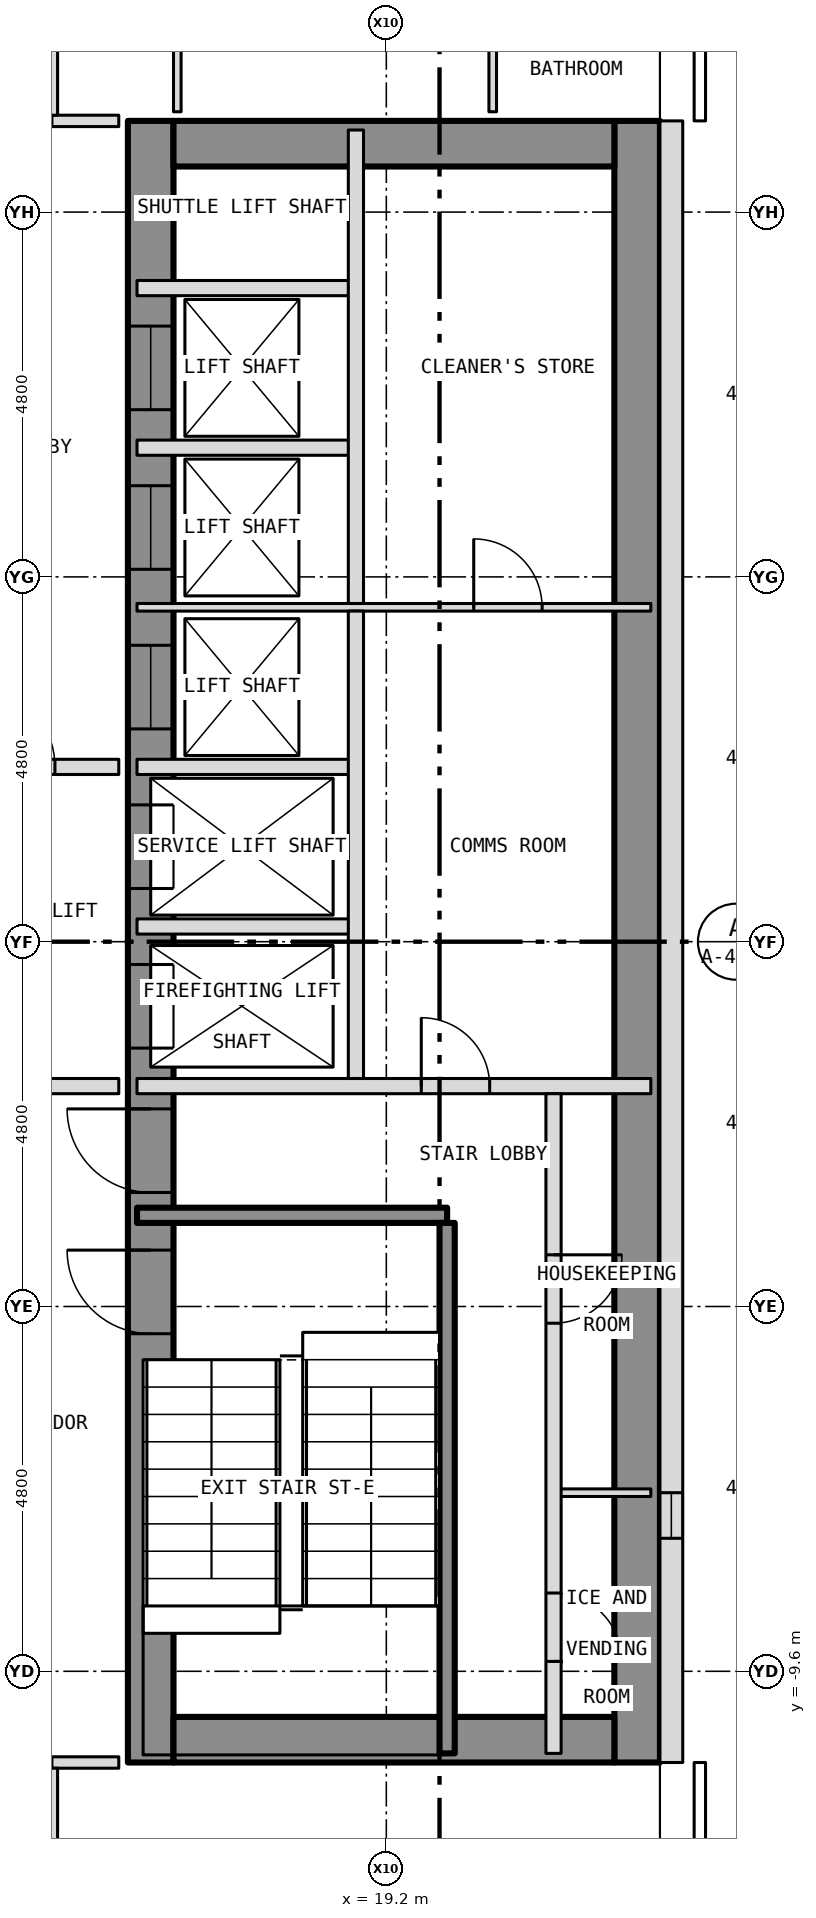
"""IFC4 building model, lengths in metres.
Left out: names, types, materials, properties, quantities, classifications, styles, units other than length and angle.
Written with IfcOpenShell. Run it as: python <this file> out.ifc"""

import sys

from ifc_helpers import new_model, si_unit, direction, frame, frame_2d, origin, place, context, subcontext, project, spatial, rectangle, extrude, element, fill, save


model = new_model("IFC4")
c1 = context("Model", 3, precision=1e-05, world=origin(), true_north=direction((0.0, 1.0)))
c2 = subcontext(c1, "Body", "Model", "MODEL_VIEW")
j1 = project(units=[si_unit("LENGTHUNIT", "METRE"), si_unit("PLANEANGLEUNIT", "RADIAN")], contexts=[c1])
p1 = place(None, origin())
s1 = spatial("IfcSite", under=j1, at=p1, CompositionType="ELEMENT")
p2 = place(p1, origin())
s2 = spatial("IfcBuilding", under=s1, at=p2, CompositionType="ELEMENT")
p3 = place(p2, frame((0.0, 0.0, 131.0)))
s3 = spatial("IfcBuildingStorey", under=s2, at=p3, CompositionType="ELEMENT", Elevation=131.0)
p4 = place(p3, frame((16.1, -10.8, 0.0), z_axis=(0.0, 0.0, 1.0), x_axis=(0.0, 1.0, 0.0)))
e1 = element("IfcWall", 1, at=p4, inside=s3, PredefinedType="SHEAR", context=c2, shape_type="SweptSolid", body=[
    extrude(rectangle(XDim=21.6, YDim=0.6, at=frame_2d((10.8, 0.0))), origin(), (0.0, 0.0, 1.0), 3.25),
])
p5 = place(p4, frame((9.4, 0.0, 0.0)))
e2 = element("IfcOpeningElement", 2, at=p5, cuts=e1, PredefinedType="OPENING", context=c2, shape_type="SweptSolid", body=[
    extrude(rectangle(XDim=1.1, YDim=2.1, at=frame_2d((0.55, 1.05))), frame((0.0, 0.312, 0.0), z_axis=(0.0, -1.0, 0.0), x_axis=(1.0, 0.0, 0.0)), (0.0, 0.0, 1.0), 0.624),
])
p6 = place(p4, frame((11.5, 0.0, 0.0)))
e3 = element("IfcOpeningElement", 3, at=p6, cuts=e1, PredefinedType="OPENING", context=c2, shape_type="SweptSolid", body=[
    extrude(rectangle(XDim=1.1, YDim=2.1, at=frame_2d((0.55, 1.05))), frame((0.0, 0.312, 0.0), z_axis=(0.0, -1.0, 0.0), x_axis=(1.0, 0.0, 0.0)), (0.0, 0.0, 1.0), 0.624),
])
p7 = place(p4, frame((13.6, 0.0, 0.0)))
e4 = element("IfcOpeningElement", 4, at=p7, cuts=e1, PredefinedType="OPENING", context=c2, shape_type="SweptSolid", body=[
    extrude(rectangle(XDim=1.1, YDim=2.1, at=frame_2d((0.55, 1.05))), frame((0.0, 0.312, 0.0), z_axis=(0.0, -1.0, 0.0), x_axis=(1.0, 0.0, 0.0)), (0.0, 0.0, 1.0), 0.624),
])
p8 = place(p4, frame((15.7, 0.0, 0.0)))
e5 = element("IfcOpeningElement", 5, at=p8, cuts=e1, PredefinedType="OPENING", context=c2, shape_type="SweptSolid", body=[
    extrude(rectangle(XDim=1.1, YDim=2.1, at=frame_2d((0.55, 1.05))), frame((0.0, 0.312, 0.0), z_axis=(0.0, -1.0, 0.0), x_axis=(1.0, 0.0, 0.0)), (0.0, 0.0, 1.0), 0.624),
])
p9 = place(p4, frame((17.8, 0.0, 0.0)))
e6 = element("IfcOpeningElement", 6, at=p9, cuts=e1, PredefinedType="OPENING", context=c2, shape_type="SweptSolid", body=[
    extrude(rectangle(XDim=1.1, YDim=2.1, at=frame_2d((0.55, 1.05))), frame((0.0, 0.312, 0.0), z_axis=(0.0, -1.0, 0.0), x_axis=(1.0, 0.0, 0.0)), (0.0, 0.0, 1.0), 0.624),
])
p10 = place(p4, frame((5.642, 0.0, 0.0)))
e7 = element("IfcOpeningElement", 7, at=p10, cuts=e1, PredefinedType="OPENING", context=c2, shape_type="SweptSolid", body=[
    extrude(rectangle(XDim=1.1, YDim=2.1, at=frame_2d((0.55, 1.05))), frame((0.0, 0.312, 0.0), z_axis=(0.0, -1.0, 0.0), x_axis=(1.0, 0.0, 0.0)), (0.0, 0.0, 1.0), 0.624),
])
p11 = place(p4, frame((7.5, 0.0, 0.0)))
e8 = element("IfcOpeningElement", 8, at=p11, cuts=e1, PredefinedType="OPENING", context=c2, shape_type="SweptSolid", body=[
    extrude(rectangle(XDim=1.1, YDim=2.1, at=frame_2d((0.55, 1.05))), frame((0.0, 0.312, 0.0), z_axis=(0.0, -1.0, 0.0), x_axis=(1.0, 0.0, 0.0)), (0.0, 0.0, 1.0), 0.624),
])
p12 = place(p3, frame((22.5, -10.8, 0.0), z_axis=(0.0, 0.0, 1.0), x_axis=(0.0, 1.0, 0.0)))
e9 = element("IfcWall", 9, at=p12, inside=s3, PredefinedType="SHEAR", context=c2, shape_type="SweptSolid", body=[
    extrude(rectangle(XDim=21.6, YDim=0.6, at=frame_2d((10.8, 0.0))), origin(), (0.0, 0.0, 1.0), 3.25),
])
for number, where, z_axis, x_axis in (
    (10, (16.4, 10.5, 0.0), (0.0, 0.0, 1.0), (1.0, 0.0, 0.0)),
    (11, (16.4, -10.5, 0.0), (0.0, 0.0, 1.0), (1.0, 0.0, 0.0)),
):
    element("IfcWall", number, at=place(p3, frame(where, z_axis=z_axis, x_axis=x_axis)), inside=s3, PredefinedType="SHEAR", context=c2, shape_type="SweptSolid", body=[
        extrude(rectangle(XDim=5.8, YDim=0.6, at=frame_2d((2.9, 0.0))), origin(), (0.0, 0.0, 1.0), 3.25),
    ])
p13 = place(p3, frame((22.95, -10.8, 0.0), z_axis=(0.0, 0.0, 1.0), x_axis=(0.0, 1.0, 0.0)))
e12 = element("IfcWall", 12, at=p13, inside=s3, PredefinedType="SOLIDWALL", context=c2, shape_type="SweptSolid", body=[
    extrude(rectangle(XDim=21.6, YDim=0.3, at=frame_2d((10.8, 0.0))), origin(), (0.0, 0.0, 1.0), 3.5),
])
p14 = place(p13, frame((2.95, 0.0, 1.0)))
e13 = element("IfcOpeningElement", 13, at=p14, cuts=e12, PredefinedType="OPENING", context=c2, shape_type="SweptSolid", body=[
    extrude(rectangle(XDim=0.6, YDim=1.5, at=frame_2d((0.3, 0.75))), frame((0.0, 0.162, 0.0), z_axis=(0.0, -1.0, 0.0), x_axis=(1.0, 0.0, 0.0)), (0.0, 0.0, 1.0), 0.324),
])
p15 = place(p3, frame((14.8, -10.8, 0.0), z_axis=(0.0, 0.0, 1.0), x_axis=(1.0, 0.0, 0.0)))
e14 = element("IfcWall", 14, at=p15, inside=s3, PredefinedType="PARTITIONING", context=c2, shape_type="SweptSolid", body=[
    extrude(rectangle(XDim=0.88, YDim=0.15, at=frame_2d((0.44, 0.0))), origin(), (0.0, 0.0, 1.0), 3.35),
])
p16 = place(p3, frame((21.4, -7.25, 0.0), z_axis=(0.0, 0.0, 1.0), x_axis=(1.0, 0.0, 0.0)))
e15 = element("IfcWall", 15, at=p16, inside=s3, PredefinedType="PARTITIONING", context=c2, shape_type="SweptSolid", body=[
    extrude(rectangle(XDim=1.28, YDim=0.1, at=frame_2d((0.64, 0.0))), origin(), (0.0, 0.0, 1.0), 3.25),
])
p17 = place(p3, frame((15.92, -3.6, 0.0), z_axis=(0.0, 0.0, 1.0), x_axis=(1.0, 0.0, 0.0)))
e16 = element("IfcWall", 16, at=p17, inside=s3, PredefinedType="SHEAR", context=c2, shape_type="SweptSolid", body=[
    extrude(rectangle(XDim=4.08, YDim=0.2, at=frame_2d((2.04, 0.0))), origin(), (0.0, 0.0, 1.0), 3.25),
])
p18 = place(p3, frame((12.4, -1.9, 0.0), z_axis=(0.0, 0.0, 1.0), x_axis=(1.0, 0.0, 0.0)))
e17 = element("IfcWall", 17, at=p18, inside=s3, PredefinedType="PARTITIONING", context=c2, shape_type="SweptSolid", body=[
    extrude(rectangle(XDim=3.28, YDim=0.2, at=frame_2d((1.64, 0.0))), origin(), (0.0, 0.0, 1.0), 3.35),
])
p19 = place(p18, frame((1.24, 0.0, 0.0)))
e18 = element("IfcOpeningElement", 18, at=p19, cuts=e17, PredefinedType="OPENING", context=c2, shape_type="SweptSolid", body=[
    extrude(rectangle(XDim=1.1, YDim=2.1, at=frame_2d((0.55, 1.05))), frame((0.0, 0.112, 0.0), z_axis=(0.0, -1.0, 0.0), x_axis=(1.0, 0.0, 0.0)), (0.0, 0.0, 1.0), 0.224),
])
p20 = place(p3, frame((15.92, -1.9, 0.0), z_axis=(0.0, 0.0, 1.0), x_axis=(1.0, 0.0, 0.0)))
e19 = element("IfcWall", 19, at=p20, inside=s3, PredefinedType="PARTITIONING", context=c2, shape_type="SweptSolid", body=[
    extrude(rectangle(XDim=6.76, YDim=0.2, at=frame_2d((3.38, 0.0))), origin(), (0.0, 0.0, 1.0), 3.25),
])
p21 = place(p20, frame((3.74, 0.0, 0.0)))
e20 = element("IfcOpeningElement", 20, at=p21, cuts=e19, PredefinedType="OPENING", context=c2, shape_type="SweptSolid", body=[
    extrude(rectangle(XDim=0.9, YDim=2.1, at=frame_2d((0.45, 1.05))), frame((0.0, 0.112, 0.0), z_axis=(0.0, -1.0, 0.0), x_axis=(1.0, 0.0, 0.0)), (0.0, 0.0, 1.0), 0.224),
])
p22 = place(p3, frame((15.92, 0.2, 0.0), z_axis=(0.0, 0.0, 1.0), x_axis=(1.0, 0.0, 0.0)))
e21 = element("IfcWall", 21, at=p22, inside=s3, PredefinedType="PARTITIONING", context=c2, shape_type="SweptSolid", body=[
    extrude(rectangle(XDim=2.88, YDim=0.2, at=frame_2d((1.44, 0.0))), origin(), (0.0, 0.0, 1.0), 3.25),
])
p23 = place(p3, frame((12.4, 2.3, 0.0), z_axis=(0.0, 0.0, 1.0), x_axis=(1.0, 0.0, 0.0)))
e22 = element("IfcWall", 22, at=p23, inside=s3, PredefinedType="PARTITIONING", context=c2, shape_type="SweptSolid", body=[
    extrude(rectangle(XDim=3.28, YDim=0.2, at=frame_2d((1.64, 0.0))), origin(), (0.0, 0.0, 1.0), 3.35),
])
p24 = place(p23, frame((1.34, 0.0, 0.0)))
e23 = element("IfcOpeningElement", 23, at=p24, cuts=e22, PredefinedType="OPENING", context=c2, shape_type="SweptSolid", body=[
    extrude(rectangle(XDim=1.1, YDim=2.1, at=frame_2d((0.55, 1.05))), frame((0.0, 0.112, 0.0), z_axis=(0.0, -1.0, 0.0), x_axis=(1.0, 0.0, 0.0)), (0.0, 0.0, 1.0), 0.224),
])
p25 = place(p3, frame((15.92, 2.3, 0.0), z_axis=(0.0, 0.0, 1.0), x_axis=(1.0, 0.0, 0.0)))
e24 = element("IfcWall", 24, at=p25, inside=s3, PredefinedType="PARTITIONING", context=c2, shape_type="SweptSolid", body=[
    extrude(rectangle(XDim=2.88, YDim=0.2, at=frame_2d((1.44, 0.0))), origin(), (0.0, 0.0, 1.0), 3.25),
])
p26 = place(p3, frame((15.92, 4.4, 0.0), z_axis=(0.0, 0.0, 1.0), x_axis=(1.0, 0.0, 0.0)))
e25 = element("IfcWall", 25, at=p26, inside=s3, PredefinedType="PARTITIONING", context=c2, shape_type="SweptSolid", body=[
    extrude(rectangle(XDim=6.76, YDim=0.1, at=frame_2d((3.38, 0.0))), origin(), (0.0, 0.0, 1.0), 3.25),
])
p27 = place(p26, frame((4.43, 0.0, 0.0)))
e26 = element("IfcOpeningElement", 26, at=p27, cuts=e25, PredefinedType="OPENING", context=c2, shape_type="SweptSolid", body=[
    extrude(rectangle(XDim=0.9, YDim=2.1, at=frame_2d((0.45, 1.05))), frame((0.0, 0.062, 0.0), z_axis=(0.0, -1.0, 0.0), x_axis=(1.0, 0.0, 0.0)), (0.0, 0.0, 1.0), 0.124),
])
for number, where, z_axis, x_axis in (
    (27, (15.92, 6.5, 0.0), (0.0, 0.0, 1.0), (1.0, 0.0, 0.0)),
    (28, (15.92, 8.6, 0.0), (0.0, 0.0, 1.0), (1.0, 0.0, 0.0)),
):
    element("IfcWall", number, at=place(p3, frame(where, z_axis=z_axis, x_axis=x_axis)), inside=s3, PredefinedType="PARTITIONING", context=c2, shape_type="SweptSolid", body=[
        extrude(rectangle(XDim=2.88, YDim=0.2, at=frame_2d((1.44, 0.0))), origin(), (0.0, 0.0, 1.0), 3.25),
    ])
p28 = place(p3, frame((14.8, 10.8, 0.0), z_axis=(0.0, 0.0, 1.0), x_axis=(1.0, 0.0, 0.0)))
e29 = element("IfcWall", 29, at=p28, inside=s3, PredefinedType="PARTITIONING", context=c2, shape_type="SweptSolid", body=[
    extrude(rectangle(XDim=0.88, YDim=0.15, at=frame_2d((0.44, 0.0))), origin(), (0.0, 0.0, 1.0), 3.35),
])
p29 = place(p3, frame((14.8, -14.725, 0.0), z_axis=(0.0, 0.0, 1.0), x_axis=(0.0, 1.0, 0.0)))
e30 = element("IfcWall", 30, at=p29, inside=s3, PredefinedType="PARTITIONING", context=c2, shape_type="SweptSolid", body=[
    extrude(rectangle(XDim=3.85, YDim=0.15, at=frame_2d((1.925, 0.0))), origin(), (0.0, 0.0, 1.0), 3.35),
])
p30 = place(p29, frame((0.525, 0.0, 0.0)))
e31 = element("IfcOpeningElement", 31, at=p30, cuts=e30, PredefinedType="OPENING", context=c2, shape_type="SweptSolid", body=[
    extrude(rectangle(XDim=1.0, YDim=2.1, at=frame_2d((0.5, 1.05))), frame((0.0, 0.087, 0.0), z_axis=(0.0, -1.0, 0.0), x_axis=(1.0, 0.0, 0.0)), (0.0, 0.0, 1.0), 0.174),
])
p31 = place(p3, frame((14.8, 10.875, 0.0), z_axis=(0.0, 0.0, 1.0), x_axis=(0.0, 1.0, 0.0)))
e32 = element("IfcWall", 32, at=p31, inside=s3, PredefinedType="PARTITIONING", context=c2, shape_type="SweptSolid", body=[
    extrude(rectangle(XDim=3.85, YDim=0.15, at=frame_2d((1.925, 0.0))), origin(), (0.0, 0.0, 1.0), 3.35),
])
p32 = place(p31, frame((2.325, 0.0, 0.0)))
e33 = element("IfcOpeningElement", 33, at=p32, cuts=e32, PredefinedType="OPENING", context=c2, shape_type="SweptSolid", body=[
    extrude(rectangle(XDim=1.0, YDim=2.1, at=frame_2d((0.5, 1.05))), frame((0.0, 0.087, 0.0), z_axis=(0.0, -1.0, 0.0), x_axis=(1.0, 0.0, 0.0)), (0.0, 0.0, 1.0), 0.174),
])
p33 = place(p3, frame((16.45, 10.92, 0.0), z_axis=(0.0, 0.0, 1.0), x_axis=(0.0, 1.0, 0.0)))
e34 = element("IfcWall", 34, at=p33, inside=s3, PredefinedType="PARTITIONING", context=c2, shape_type="SweptSolid", body=[
    extrude(rectangle(XDim=12.36, YDim=0.1, at=frame_2d((6.18, 0.0))), origin(), (0.0, 0.0, 1.0), 3.35),
])
p34 = place(p33, frame((5.43, 0.0, 0.0)))
e35 = element("IfcOpeningElement", 35, at=p34, cuts=e34, PredefinedType="OPENING", context=c2, shape_type="SweptSolid", body=[
    extrude(rectangle(XDim=0.9, YDim=2.1, at=frame_2d((0.45, 1.05))), frame((0.0, 0.062, 0.0), z_axis=(0.0, -1.0, 0.0), x_axis=(1.0, 0.0, 0.0)), (0.0, 0.0, 1.0), 0.124),
])
p35 = place(p3, frame((18.8, -1.8, 0.0), z_axis=(0.0, 0.0, 1.0), x_axis=(0.0, 1.0, 0.0)))
e36 = element("IfcWall", 36, at=p35, inside=s3, PredefinedType="PARTITIONING", context=c2, shape_type="SweptSolid", body=[
    extrude(rectangle(XDim=6.15, YDim=0.2, at=frame_2d((3.075, 0.0))), origin(), (0.0, 0.0, 1.0), 3.25),
])
p36 = place(p3, frame((18.8, 4.45, 0.0), z_axis=(0.0, 0.0, 1.0), x_axis=(0.0, 1.0, 0.0)))
e37 = element("IfcWall", 37, at=p36, inside=s3, PredefinedType="PARTITIONING", context=c2, shape_type="SweptSolid", body=[
    extrude(rectangle(XDim=6.23, YDim=0.2, at=frame_2d((3.115, 0.0))), origin(), (0.0, 0.0, 1.0), 3.25),
])
p37 = place(p3, frame((20.0, -10.68, 0.0), z_axis=(0.0, 0.0, 1.0), x_axis=(0.0, 1.0, 0.0)))
e38 = element("IfcWall", 38, at=p37, inside=s3, PredefinedType="SHEAR", context=c2, shape_type="SweptSolid", body=[
    extrude(rectangle(XDim=6.98, YDim=0.2, at=frame_2d((3.49, 0.0))), origin(), (0.0, 0.0, 1.0), 3.25),
])
p38 = place(p3, frame((20.6, 10.92, 0.0), z_axis=(0.0, 0.0, 1.0), x_axis=(0.0, 1.0, 0.0)))
e39 = element("IfcWall", 39, at=p38, inside=s3, PredefinedType="PARTITIONING", context=c2, shape_type="SweptSolid", body=[
    extrude(rectangle(XDim=3.03, YDim=0.1, at=frame_2d((1.515, 0.0))), origin(), (0.0, 0.0, 1.0), 3.35),
])
p39 = place(p38, frame((1.67, 0.0, 0.0)))
e40 = element("IfcOpeningElement", 40, at=p39, cuts=e39, PredefinedType="OPENING", context=c2, shape_type="SweptSolid", body=[
    extrude(rectangle(XDim=0.9, YDim=2.1, at=frame_2d((0.45, 1.05))), frame((0.0, 0.062, 0.0), z_axis=(0.0, -1.0, 0.0), x_axis=(1.0, 0.0, 0.0)), (0.0, 0.0, 1.0), 0.124),
])
p40 = place(p3, frame((21.4, -10.68, 0.0), z_axis=(0.0, 0.0, 1.0), x_axis=(0.0, 1.0, 0.0)))
e41 = element("IfcWall", 41, at=p40, inside=s3, PredefinedType="PARTITIONING", context=c2, shape_type="SweptSolid", body=[
    extrude(rectangle(XDim=8.68, YDim=0.2, at=frame_2d((4.34, 0.0))), origin(), (0.0, 0.0, 1.0), 3.25),
])
p41 = place(p40, frame((1.21, 0.0, 0.0)))
e42 = element("IfcOpeningElement", 42, at=p41, cuts=e41, PredefinedType="OPENING", context=c2, shape_type="SweptSolid", body=[
    extrude(rectangle(XDim=0.9, YDim=2.1, at=frame_2d((0.45, 1.05))), frame((0.0, 0.112, 0.0), z_axis=(0.0, -1.0, 0.0), x_axis=(1.0, 0.0, 0.0)), (0.0, 0.0, 1.0), 0.224),
])
p42 = place(p40, frame((5.66, 0.0, 0.0)))
e43 = element("IfcOpeningElement", 43, at=p42, cuts=e41, PredefinedType="OPENING", context=c2, shape_type="SweptSolid", body=[
    extrude(rectangle(XDim=0.9, YDim=2.1, at=frame_2d((0.45, 1.05))), frame((0.0, 0.112, 0.0), z_axis=(0.0, -1.0, 0.0), x_axis=(1.0, 0.0, 0.0)), (0.0, 0.0, 1.0), 0.224),
])
p43 = place(p14, origin())
e44 = element("IfcWindow", 44, at=p43, inside=s3, PartitioningType="SINGLE_PANEL", PredefinedType="WINDOW", context=c2, shape_type="SweptSolid", body=[
    extrude(rectangle(XDim=0.6, YDim=1.5, at=frame_2d((0.3, 0.75))), frame((0.0, -0.06, 0.0), z_axis=(0.0, -1.0, 0.0), x_axis=(1.0, 0.0, 0.0)), (0.0, 0.0, 1.0), 0.06),
])
fill(e13, e44)
p44 = place(p5, origin())
e45 = element("IfcDoor", 45, at=p44, inside=s3, OperationType="SLIDING_TO_LEFT", PredefinedType="DOOR", context=c2, shape_type="SweptSolid", body=[
    extrude(rectangle(XDim=1.1, YDim=2.1, at=frame_2d((0.55, 1.05))), frame((0.0, 0.025, 0.0), z_axis=(0.0, -1.0, 0.0), x_axis=(1.0, 0.0, 0.0)), (0.0, 0.0, 1.0), 0.05),
])
fill(e2, e45)
p45 = place(p6, origin())
e46 = element("IfcDoor", 46, at=p45, inside=s3, OperationType="SLIDING_TO_LEFT", PredefinedType="DOOR", context=c2, shape_type="SweptSolid", body=[
    extrude(rectangle(XDim=1.1, YDim=2.1, at=frame_2d((0.55, 1.05))), frame((0.0, 0.025, 0.0), z_axis=(0.0, -1.0, 0.0), x_axis=(1.0, 0.0, 0.0)), (0.0, 0.0, 1.0), 0.05),
])
fill(e3, e46)
p46 = place(p7, origin())
e47 = element("IfcDoor", 47, at=p46, inside=s3, OperationType="SLIDING_TO_LEFT", PredefinedType="DOOR", context=c2, shape_type="SweptSolid", body=[
    extrude(rectangle(XDim=1.1, YDim=2.1, at=frame_2d((0.55, 1.05))), frame((0.0, 0.025, 0.0), z_axis=(0.0, -1.0, 0.0), x_axis=(1.0, 0.0, 0.0)), (0.0, 0.0, 1.0), 0.05),
])
fill(e4, e47)
p47 = place(p8, origin())
e48 = element("IfcDoor", 48, at=p47, inside=s3, OperationType="SLIDING_TO_LEFT", PredefinedType="DOOR", context=c2, shape_type="SweptSolid", body=[
    extrude(rectangle(XDim=1.1, YDim=2.1, at=frame_2d((0.55, 1.05))), frame((0.0, 0.025, 0.0), z_axis=(0.0, -1.0, 0.0), x_axis=(1.0, 0.0, 0.0)), (0.0, 0.0, 1.0), 0.05),
])
fill(e5, e48)
p48 = place(p9, origin())
e49 = element("IfcDoor", 49, at=p48, inside=s3, OperationType="SLIDING_TO_LEFT", PredefinedType="DOOR", context=c2, shape_type="SweptSolid", body=[
    extrude(rectangle(XDim=1.1, YDim=2.1, at=frame_2d((0.55, 1.05))), frame((0.0, 0.025, 0.0), z_axis=(0.0, -1.0, 0.0), x_axis=(1.0, 0.0, 0.0)), (0.0, 0.0, 1.0), 0.05),
])
fill(e6, e49)
p49 = place(p10, origin())
e50 = element("IfcDoor", 50, at=p49, inside=s3, OperationType="SINGLE_SWING_RIGHT", PredefinedType="DOOR", context=c2, shape_type="SweptSolid", body=[
    extrude(rectangle(XDim=1.1, YDim=2.1, at=frame_2d((0.55, 1.05))), frame((0.0, 0.025, 0.0), z_axis=(0.0, -1.0, 0.0), x_axis=(1.0, 0.0, 0.0)), (0.0, 0.0, 1.0), 0.05),
])
fill(e7, e50)
p50 = place(p11, origin())
e51 = element("IfcDoor", 51, at=p50, inside=s3, OperationType="SINGLE_SWING_RIGHT", PredefinedType="DOOR", context=c2, shape_type="SweptSolid", body=[
    extrude(rectangle(XDim=1.1, YDim=2.1, at=frame_2d((0.55, 1.05))), frame((0.0, 0.025, 0.0), z_axis=(0.0, -1.0, 0.0), x_axis=(1.0, 0.0, 0.0)), (0.0, 0.0, 1.0), 0.05),
])
fill(e8, e51)
p51 = place(p41, origin())
e52 = element("IfcDoor", 52, at=p51, inside=s3, OperationType="SINGLE_SWING_LEFT", PredefinedType="DOOR", context=c2, shape_type="SweptSolid", body=[
    extrude(rectangle(XDim=0.9, YDim=2.1, at=frame_2d((0.45, 1.05))), frame((0.0, 0.025, 0.0), z_axis=(0.0, -1.0, 0.0), x_axis=(1.0, 0.0, 0.0)), (0.0, 0.0, 1.0), 0.05),
])
fill(e42, e52)
p52 = place(p42, origin())
e53 = element("IfcDoor", 53, at=p52, inside=s3, OperationType="SINGLE_SWING_RIGHT", PredefinedType="DOOR", context=c2, shape_type="SweptSolid", body=[
    extrude(rectangle(XDim=0.9, YDim=2.1, at=frame_2d((0.45, 1.05))), frame((0.0, 0.025, 0.0), z_axis=(0.0, -1.0, 0.0), x_axis=(1.0, 0.0, 0.0)), (0.0, 0.0, 1.0), 0.05),
])
fill(e43, e53)
p53 = place(p21, origin())
e54 = element("IfcDoor", 54, at=p53, inside=s3, OperationType="SINGLE_SWING_LEFT", PredefinedType="DOOR", context=c2, shape_type="SweptSolid", body=[
    extrude(rectangle(XDim=0.9, YDim=2.1, at=frame_2d((0.45, 1.05))), frame((0.0, 0.025, 0.0), z_axis=(0.0, -1.0, 0.0), x_axis=(1.0, 0.0, 0.0)), (0.0, 0.0, 1.0), 0.05),
])
fill(e20, e54)
p54 = place(p27, origin())
e55 = element("IfcDoor", 55, at=p54, inside=s3, OperationType="SINGLE_SWING_LEFT", PredefinedType="DOOR", context=c2, shape_type="SweptSolid", body=[
    extrude(rectangle(XDim=0.9, YDim=2.1, at=frame_2d((0.45, 1.05))), frame((0.0, 0.025, 0.0), z_axis=(0.0, -1.0, 0.0), x_axis=(1.0, 0.0, 0.0)), (0.0, 0.0, 1.0), 0.05),
])
fill(e26, e55)
p55 = place(p24, origin())
e56 = element("IfcDoor", 56, at=p55, inside=s3, OperationType="SINGLE_SWING_LEFT", PredefinedType="DOOR", context=c2, shape_type="SweptSolid", body=[
    extrude(rectangle(XDim=1.1, YDim=2.1, at=frame_2d((0.55, 1.05))), frame((0.0, 0.025, 0.0), z_axis=(0.0, -1.0, 0.0), x_axis=(1.0, 0.0, 0.0)), (0.0, 0.0, 1.0), 0.05),
])
fill(e23, e56)
save(model, sys.argv[1])
